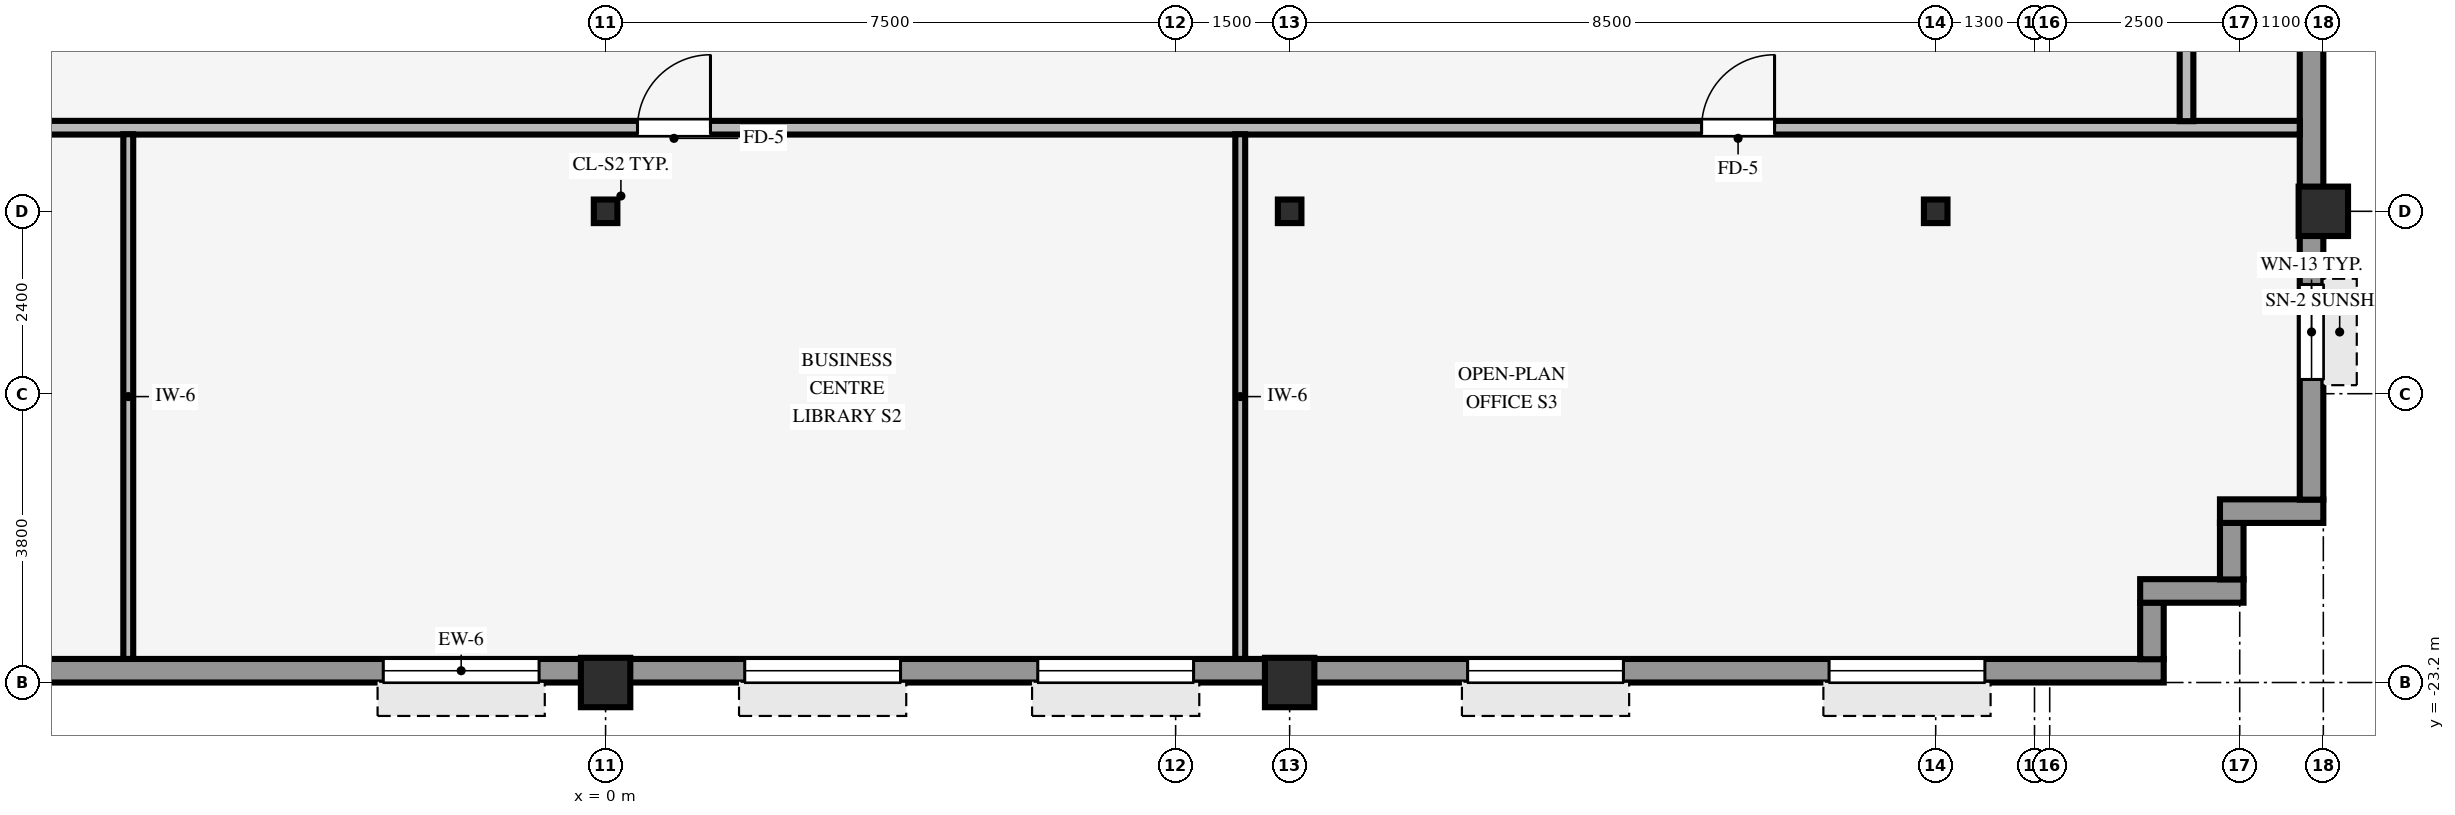
"""IFC4 building model, lengths in metres.
Left out: names, types, materials, properties, quantities, classifications, styles, units other than length and angle.
Written with IfcOpenShell. Run it as: python <this file> out.ifc"""

import sys

from ifc_helpers import new_model, si_unit, direction, frame, frame_2d, origin, origin_2d, place, context, subcontext, project, spatial, rectangle, hollow_rectangle, i_section, extrude, source, transform, mapped, element, fill, save


model = new_model("IFC4")
c1 = context("Model", 3, precision=1e-05, world=origin(), true_north=direction((0.0, 1.0)))
c2 = subcontext(c1, "Body", "Model", "MODEL_VIEW")
j1 = project(units=[si_unit("LENGTHUNIT", "METRE"), si_unit("PLANEANGLEUNIT", "RADIAN")], contexts=[c1])
p1 = place(None, origin())
s1 = spatial("IfcSite", under=j1, at=p1, CompositionType="ELEMENT")
p2 = place(p1, origin())
s2 = spatial("IfcBuilding", under=s1, at=p2, CompositionType="ELEMENT")
p3 = place(p2, frame((0.0, 0.0, 171.3)))
s3 = spatial("IfcBuildingStorey", under=s2, at=p3, CompositionType="ELEMENT", Elevation=171.3)
for number, where, z_axis, x_axis in (
    (1, (22.6, -17.0, 0.0), (0.0, 0.0, 1.0), (1.0, 0.0, 0.0)),
    (2, (0.0, -23.2, 0.0), (0.0, 0.0, 1.0), (1.0, 0.0, 0.0)),
    (3, (9.0, -23.2, 0.0), (0.0, 0.0, 1.0), (1.0, 0.0, 0.0)),
):
    element("IfcColumn", number, at=place(p3, frame(where, z_axis=z_axis, x_axis=x_axis)), inside=s3, PredefinedType="COLUMN", context=c2, shape_type="SweptSolid", body=[
        extrude(hollow_rectangle(XDim=0.65, YDim=0.65, WallThickness=0.04, InnerFilletRadius=0.04, OuterFilletRadius=0.08, at=origin_2d()), origin(), (0.0, 0.0, 1.0), 3.37),
    ])
for number, where, z_axis, x_axis in (
    (4, (0.0, -17.0, 0.0), (0.0, 0.0, 1.0), (1.0, 0.0, 0.0)),
    (5, (9.0, -17.0, 0.0), (0.0, 0.0, 1.0), (1.0, 0.0, 0.0)),
    (6, (17.5, -17.0, 0.0), (0.0, 0.0, 1.0), (1.0, 0.0, 0.0)),
):
    element("IfcColumn", number, at=place(p3, frame(where, z_axis=z_axis, x_axis=x_axis)), inside=s3, PredefinedType="COLUMN", context=c2, shape_type="SweptSolid", body=[
        extrude(i_section(OverallWidth=0.31, OverallDepth=0.31, WebThickness=0.015, FlangeThickness=0.015, FilletRadius=0.015, at=origin_2d()), origin(), (0.0, 0.0, 1.0), 3.37),
    ])
p4 = place(p3, frame((-24.3, -23.045, 0.0), z_axis=(0.0, 0.0, 1.0), x_axis=(1.0, 0.0, 0.0)))
e7 = element("IfcWall", 7, at=p4, inside=s3, PredefinedType="STANDARD", context=c2, shape_type="SweptSolid", body=[
    extrude(rectangle(XDim=44.8, YDim=0.31, at=frame_2d((22.4, 0.0))), origin(), (0.0, 0.0, 1.0), 2.705),
])
p5 = place(p4, frame((2.353, 0.0, 0.8)))
e8 = element("IfcOpeningElement", 8, at=p5, cuts=e7, PredefinedType="OPENING", context=c2, shape_type="SweptSolid", body=[
    extrude(rectangle(XDim=2.05, YDim=1.52, at=frame_2d((1.025, 0.76))), frame((0.0, 0.165, 0.0), z_axis=(0.0, -1.0, 0.0), x_axis=(1.0, 0.0, 0.0)), (0.0, 0.0, 1.0), 0.33),
])
p6 = place(p4, frame((7.108, 0.0, 0.8)))
e9 = element("IfcOpeningElement", 9, at=p6, cuts=e7, PredefinedType="OPENING", context=c2, shape_type="SweptSolid", body=[
    extrude(rectangle(XDim=2.05, YDim=1.52, at=frame_2d((1.025, 0.76))), frame((0.0, 0.165, 0.0), z_axis=(0.0, -1.0, 0.0), x_axis=(1.0, 0.0, 0.0)), (0.0, 0.0, 1.0), 0.33),
])
p7 = place(p4, frame((11.864, 0.0, 0.8)))
e10 = element("IfcOpeningElement", 10, at=p7, cuts=e7, PredefinedType="OPENING", context=c2, shape_type="SweptSolid", body=[
    extrude(rectangle(XDim=2.05, YDim=1.52, at=frame_2d((1.025, 0.76))), frame((0.0, 0.165, 0.0), z_axis=(0.0, -1.0, 0.0), x_axis=(1.0, 0.0, 0.0)), (0.0, 0.0, 1.0), 0.33),
])
p8 = place(p4, frame((21.375, 0.0, 0.8)))
e11 = element("IfcOpeningElement", 11, at=p8, cuts=e7, PredefinedType="OPENING", context=c2, shape_type="SweptSolid", body=[
    extrude(rectangle(XDim=2.05, YDim=1.52, at=frame_2d((1.025, 0.76))), frame((0.0, 0.165, 0.0), z_axis=(0.0, -1.0, 0.0), x_axis=(1.0, 0.0, 0.0)), (0.0, 0.0, 1.0), 0.33),
])
p9 = place(p4, frame((26.131, 0.0, 0.8)))
e12 = element("IfcOpeningElement", 12, at=p9, cuts=e7, PredefinedType="OPENING", context=c2, shape_type="SweptSolid", body=[
    extrude(rectangle(XDim=2.05, YDim=1.52, at=frame_2d((1.025, 0.76))), frame((0.0, 0.165, 0.0), z_axis=(0.0, -1.0, 0.0), x_axis=(1.0, 0.0, 0.0)), (0.0, 0.0, 1.0), 0.33),
])
p10 = place(p4, frame((29.986, 0.0, 0.8)))
e13 = element("IfcOpeningElement", 13, at=p10, cuts=e7, PredefinedType="OPENING", context=c2, shape_type="SweptSolid", body=[
    extrude(rectangle(XDim=2.05, YDim=1.52, at=frame_2d((1.025, 0.76))), frame((0.0, 0.165, 0.0), z_axis=(0.0, -1.0, 0.0), x_axis=(1.0, 0.0, 0.0)), (0.0, 0.0, 1.0), 0.33),
])
p11 = place(p4, frame((35.642, 0.0, 0.8)))
e14 = element("IfcOpeningElement", 14, at=p11, cuts=e7, PredefinedType="OPENING", context=c2, shape_type="SweptSolid", body=[
    extrude(rectangle(XDim=2.05, YDim=1.52, at=frame_2d((1.025, 0.76))), frame((0.0, 0.165, 0.0), z_axis=(0.0, -1.0, 0.0), x_axis=(1.0, 0.0, 0.0)), (0.0, 0.0, 1.0), 0.33),
])
p12 = place(p4, frame((40.397, 0.0, 0.8)))
e15 = element("IfcOpeningElement", 15, at=p12, cuts=e7, PredefinedType="OPENING", context=c2, shape_type="SweptSolid", body=[
    extrude(rectangle(XDim=2.05, YDim=1.52, at=frame_2d((1.025, 0.76))), frame((0.0, 0.165, 0.0), z_axis=(0.0, -1.0, 0.0), x_axis=(1.0, 0.0, 0.0)), (0.0, 0.0, 1.0), 0.33),
])
p13 = place(p3, frame((20.345, -22.894, 0.0), z_axis=(0.0, 0.0, 1.0), x_axis=(0.0, 1.0, 0.0)))
e16 = element("IfcWall", 16, at=p13, inside=s3, PredefinedType="STANDARD", context=c2, shape_type="SweptSolid", body=[
    extrude(rectangle(XDim=0.748, YDim=0.31, at=frame_2d((0.374, 0.0))), origin(), (0.0, 0.0, 1.0), 3.36),
])
p14 = place(p3, frame((20.19, -21.995, 0.0), z_axis=(0.0, 0.0, 1.0), x_axis=(1.0, 0.0, 0.0)))
e17 = element("IfcWall", 17, at=p14, inside=s3, PredefinedType="STANDARD", context=c2, shape_type="SweptSolid", body=[
    extrude(rectangle(XDim=1.36, YDim=0.31, at=frame_2d((0.68, 0.0))), origin(), (0.0, 0.0, 1.0), 3.36),
])
p15 = place(p3, frame((21.395, -21.844, 0.0), z_axis=(0.0, 0.0, 1.0), x_axis=(0.0, 1.0, 0.0)))
e18 = element("IfcWall", 18, at=p15, inside=s3, PredefinedType="STANDARD", context=c2, shape_type="SweptSolid", body=[
    extrude(rectangle(XDim=0.748, YDim=0.31, at=frame_2d((0.374, 0.0))), origin(), (0.0, 0.0, 1.0), 3.36),
])
p16 = place(p3, frame((21.24, -20.945, 0.0), z_axis=(0.0, 0.0, 1.0), x_axis=(1.0, 0.0, 0.0)))
e19 = element("IfcWall", 19, at=p16, inside=s3, PredefinedType="STANDARD", context=c2, shape_type="SweptSolid", body=[
    extrude(rectangle(XDim=1.36, YDim=0.31, at=frame_2d((0.68, 0.0))), origin(), (0.0, 0.0, 1.0), 3.36),
])
p17 = place(p3, frame((22.445, -20.794, 0.0), z_axis=(0.0, 0.0, 1.0), x_axis=(0.0, 1.0, 0.0)))
e20 = element("IfcWall", 20, at=p17, inside=s3, PredefinedType="STANDARD", context=c2, shape_type="SweptSolid", body=[
    extrude(rectangle(XDim=37.788, YDim=0.31, at=frame_2d((18.894, 0.0))), origin(), (0.0, 0.0, 1.0), 2.705),
])
p18 = place(p17, frame((16.474, 0.0, 0.0), z_axis=(0.0, 0.0, 1.0), x_axis=(-1.0, 0.0, 0.0)))
e21 = element("IfcOpeningElement", 21, at=p18, cuts=e20, PredefinedType="OPENING", context=c2, shape_type="SweptSolid", body=[
    extrude(rectangle(XDim=0.98, YDim=2.15, at=frame_2d((0.49, 1.075))), frame((0.0, 0.165, 0.0), z_axis=(0.0, -1.0, 0.0), x_axis=(1.0, 0.0, 0.0)), (0.0, 0.0, 1.0), 0.33),
])
p19 = place(p17, frame((1.581, 0.0, 0.8)))
e22 = element("IfcOpeningElement", 22, at=p19, cuts=e20, PredefinedType="OPENING", context=c2, shape_type="SweptSolid", body=[
    extrude(rectangle(XDim=1.25, YDim=1.52, at=frame_2d((0.625, 0.76))), frame((0.0, 0.165, 0.0), z_axis=(0.0, -1.0, 0.0), x_axis=(1.0, 0.0, 0.0)), (0.0, 0.0, 1.0), 0.33),
])
p20 = place(p17, frame((8.044, 0.0, 0.8)))
e23 = element("IfcOpeningElement", 23, at=p20, cuts=e20, PredefinedType="OPENING", context=c2, shape_type="SweptSolid", body=[
    extrude(rectangle(XDim=1.25, YDim=1.52, at=frame_2d((0.625, 0.76))), frame((0.0, 0.165, 0.0), z_axis=(0.0, -1.0, 0.0), x_axis=(1.0, 0.0, 0.0)), (0.0, 0.0, 1.0), 0.33),
])
p21 = place(p17, frame((13.156, 0.0, 0.8)))
e24 = element("IfcOpeningElement", 24, at=p21, cuts=e20, PredefinedType="OPENING", context=c2, shape_type="SweptSolid", body=[
    extrude(rectangle(XDim=1.25, YDim=1.52, at=frame_2d((0.625, 0.76))), frame((0.0, 0.165, 0.0), z_axis=(0.0, -1.0, 0.0), x_axis=(1.0, 0.0, 0.0)), (0.0, 0.0, 1.0), 0.33),
])
p22 = place(p17, frame((18.269, 0.0, 0.8)))
e25 = element("IfcOpeningElement", 25, at=p22, cuts=e20, PredefinedType="OPENING", context=c2, shape_type="SweptSolid", body=[
    extrude(rectangle(XDim=1.25, YDim=1.52, at=frame_2d((0.625, 0.76))), frame((0.0, 0.165, 0.0), z_axis=(0.0, -1.0, 0.0), x_axis=(1.0, 0.0, 0.0)), (0.0, 0.0, 1.0), 0.33),
])
p23 = place(p17, frame((23.382, 0.0, 0.8)))
e26 = element("IfcOpeningElement", 26, at=p23, cuts=e20, PredefinedType="OPENING", context=c2, shape_type="SweptSolid", body=[
    extrude(rectangle(XDim=1.25, YDim=1.52, at=frame_2d((0.625, 0.76))), frame((0.0, 0.165, 0.0), z_axis=(0.0, -1.0, 0.0), x_axis=(1.0, 0.0, 0.0)), (0.0, 0.0, 1.0), 0.33),
])
p24 = place(p17, frame((28.044, 0.0, 0.8)))
e27 = element("IfcOpeningElement", 27, at=p24, cuts=e20, PredefinedType="OPENING", context=c2, shape_type="SweptSolid", body=[
    extrude(rectangle(XDim=1.25, YDim=1.52, at=frame_2d((0.625, 0.76))), frame((0.0, 0.165, 0.0), z_axis=(0.0, -1.0, 0.0), x_axis=(1.0, 0.0, 0.0)), (0.0, 0.0, 1.0), 0.33),
])
p25 = place(p17, frame((33.607, 0.0, 0.8)))
e28 = element("IfcOpeningElement", 28, at=p25, cuts=e20, PredefinedType="OPENING", context=c2, shape_type="SweptSolid", body=[
    extrude(rectangle(XDim=1.25, YDim=1.52, at=frame_2d((0.625, 0.76))), frame((0.0, 0.165, 0.0), z_axis=(0.0, -1.0, 0.0), x_axis=(1.0, 0.0, 0.0)), (0.0, 0.0, 1.0), 0.33),
])
p26 = place(p3, frame((-26.09, -15.9, 0.0), z_axis=(0.0, 0.0, 1.0), x_axis=(1.0, 0.0, 0.0)))
e29 = element("IfcWall", 29, at=p26, inside=s3, PredefinedType="PARTITIONING", context=c2, shape_type="SweptSolid", body=[
    extrude(rectangle(XDim=48.38, YDim=0.18, at=frame_2d((24.19, 0.0))), origin(), (0.0, 0.0, 1.0), 3.36),
])
p27 = place(p26, frame((26.51, 0.0, 0.0)))
e30 = element("IfcOpeningElement", 30, at=p27, cuts=e29, PredefinedType="OPENING", context=c2, shape_type="SweptSolid", body=[
    extrude(rectangle(XDim=0.96, YDim=2.1, at=frame_2d((0.48, 1.05))), frame((0.0, 0.1, 0.0), z_axis=(0.0, -1.0, 0.0), x_axis=(1.0, 0.0, 0.0)), (0.0, 0.0, 1.0), 0.2),
])
p28 = place(p26, frame((40.51, 0.0, 0.0)))
e31 = element("IfcOpeningElement", 31, at=p28, cuts=e29, PredefinedType="OPENING", context=c2, shape_type="SweptSolid", body=[
    extrude(rectangle(XDim=0.96, YDim=2.1, at=frame_2d((0.48, 1.05))), frame((0.0, 0.1, 0.0), z_axis=(0.0, -1.0, 0.0), x_axis=(1.0, 0.0, 0.0)), (0.0, 0.0, 1.0), 0.2),
])
p29 = place(p26, frame((13.62, 0.0, 0.0)))
e32 = element("IfcOpeningElement", 32, at=p29, cuts=e29, PredefinedType="OPENING", context=c2, shape_type="SweptSolid", body=[
    extrude(rectangle(XDim=0.96, YDim=2.1, at=frame_2d((0.48, 1.05))), frame((0.0, 0.1, 0.0), z_axis=(0.0, -1.0, 0.0), x_axis=(1.0, 0.0, 0.0)), (0.0, 0.0, 1.0), 0.2),
])
for number, where, z_axis, x_axis in (
    (33, (-6.28, -22.89, 0.0), (0.0, 0.0, 1.0), (0.0, 1.0, 0.0)),
    (34, (8.35, -22.89, 0.0), (0.0, 0.0, 1.0), (0.0, 1.0, 0.0)),
):
    element("IfcWall", number, at=place(p3, frame(where, z_axis=z_axis, x_axis=x_axis)), inside=s3, PredefinedType="PARTITIONING", context=c2, shape_type="SweptSolid", body=[
        extrude(rectangle(XDim=6.904, YDim=0.13, at=frame_2d((3.452, 0.0))), origin(), (0.0, 0.0, 1.0), 3.36),
    ])
p30 = place(p3, frame((20.8, -15.814, 0.0), z_axis=(0.0, 0.0, 1.0), x_axis=(0.0, 1.0, 0.0)))
e35 = element("IfcWall", 35, at=p30, inside=s3, PredefinedType="PARTITIONING", context=c2, shape_type="SweptSolid", body=[
    extrude(rectangle(XDim=2.228, YDim=0.18, at=frame_2d((1.114, 0.0))), origin(), (0.0, 0.0, 1.0), 3.36),
])
m1 = source(origin(), c2, "Body", "SweptSolid", [
    extrude(rectangle(XDim=2.05, YDim=1.52, at=frame_2d((1.025, 0.76))), frame((0.0, 0.03, 0.0), z_axis=(0.0, -1.0, 0.0), x_axis=(1.0, 0.0, 0.0)), (0.0, 0.0, 1.0), 0.06),
])
p31 = place(p8, origin())
e36 = element("IfcWindow", 36, at=p31, inside=s3, PartitioningType="SINGLE_PANEL", PredefinedType="WINDOW", context=c2, shape_type="MappedRepresentation", body=[
    mapped(m1, transform((0.0, 0.0, 0.0), scale=1.0)),
])
fill(e11, e36)
p32 = place(p9, origin())
e37 = element("IfcWindow", 37, at=p32, inside=s3, PartitioningType="SINGLE_PANEL", PredefinedType="WINDOW", context=c2, shape_type="MappedRepresentation", body=[
    mapped(m1, transform((0.0, 0.0, 0.0), scale=1.0)),
])
fill(e12, e37)
p33 = place(p10, origin())
e38 = element("IfcWindow", 38, at=p33, inside=s3, PartitioningType="SINGLE_PANEL", PredefinedType="WINDOW", context=c2, shape_type="MappedRepresentation", body=[
    mapped(m1, transform((0.0, 0.0, 0.0), scale=1.0)),
])
fill(e13, e38)
p34 = place(p11, origin())
e39 = element("IfcWindow", 39, at=p34, inside=s3, PartitioningType="SINGLE_PANEL", PredefinedType="WINDOW", context=c2, shape_type="MappedRepresentation", body=[
    mapped(m1, transform((0.0, 0.0, 0.0), scale=1.0)),
])
fill(e14, e39)
p35 = place(p12, origin())
e40 = element("IfcWindow", 40, at=p35, inside=s3, PartitioningType="SINGLE_PANEL", PredefinedType="WINDOW", context=c2, shape_type="MappedRepresentation", body=[
    mapped(m1, transform((0.0, 0.0, 0.0), scale=1.0)),
])
fill(e15, e40)
m2 = source(origin(), c2, "Body", "SweptSolid", [
    extrude(rectangle(XDim=1.25, YDim=1.52, at=frame_2d((0.625, 0.76))), frame((0.0, 0.03, 0.0), z_axis=(0.0, -1.0, 0.0), x_axis=(1.0, 0.0, 0.0)), (0.0, 0.0, 1.0), 0.06),
])
p36 = place(p19, origin())
e41 = element("IfcWindow", 41, at=p36, inside=s3, PartitioningType="SINGLE_PANEL", PredefinedType="WINDOW", context=c2, shape_type="MappedRepresentation", body=[
    mapped(m2, transform((0.0, 0.0, 0.0), scale=1.0)),
])
fill(e22, e41)
m3 = source(origin(), c2, "Body", "SweptSolid", [
    extrude(rectangle(XDim=0.96, YDim=2.1, at=frame_2d((0.48, 1.05))), frame((0.0, 0.025, 0.0), z_axis=(0.0, -1.0, 0.0), x_axis=(1.0, 0.0, 0.0)), (0.0, 0.0, 1.0), 0.05),
])
p37 = place(p27, origin())
e42 = element("IfcDoor", 42, at=p37, inside=s3, OperationType="SINGLE_SWING_RIGHT", PredefinedType="DOOR", context=c2, shape_type="MappedRepresentation", body=[
    mapped(m3, transform((0.0, 0.0, 0.0), scale=1.0)),
])
fill(e30, e42)
p38 = place(p28, origin())
e43 = element("IfcDoor", 43, at=p38, inside=s3, OperationType="SINGLE_SWING_RIGHT", PredefinedType="DOOR", context=c2, shape_type="MappedRepresentation", body=[
    mapped(m3, transform((0.0, 0.0, 0.0), scale=1.0)),
])
fill(e31, e43)
save(model, sys.argv[1])
